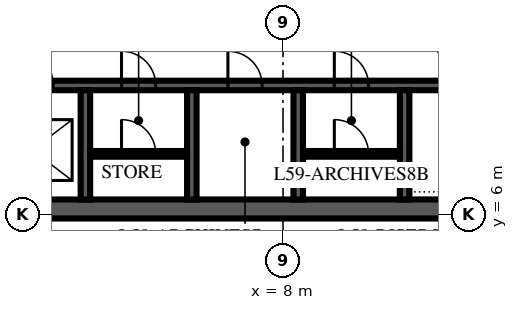
"""IFC4 building model, lengths in metres.
Left out: names, types, materials, properties, quantities, classifications, styles, units other than length and angle.
Written with IfcOpenShell. Run it as: python <this file> out.ifc"""

import sys

from ifc_helpers import new_model, si_unit, direction, frame, frame_2d, origin, place, context, subcontext, project, spatial, rectangle, extrude, element, fill, save


model = new_model("IFC4")
c1 = context("Model", 3, precision=1e-05, world=origin(), true_north=direction((0.0, 1.0)))
c2 = subcontext(c1, "Body", "Model", "MODEL_VIEW")
j1 = project(units=[si_unit("LENGTHUNIT", "METRE"), si_unit("PLANEANGLEUNIT", "RADIAN")], contexts=[c1])
p1 = place(None, origin())
s1 = spatial("IfcSite", under=j1, at=p1, CompositionType="ELEMENT")
p2 = place(p1, origin())
s2 = spatial("IfcBuilding", under=s1, at=p2, CompositionType="ELEMENT")
p3 = place(p2, frame((0.0, 0.0, 256.0)))
s3 = spatial("IfcBuildingStorey", under=s2, at=p3, CompositionType="ELEMENT", Elevation=256.0)
p4 = place(p3, frame((-13.85, 6.15, 0.0), z_axis=(0.0, 0.0, 1.0), x_axis=(1.0, 0.0, 0.0)))
e1 = element("IfcWall", 1, at=p4, inside=s3, PredefinedType="SHEAR", context=c2, shape_type="SweptSolid", body=[
    extrude(rectangle(XDim=27.7, YDim=0.5, at=frame_2d((13.85, 0.0))), origin(), (0.0, 0.0, 1.0), 4.0),
])
p5 = place(p3, frame((-13.6, 9.4, 0.0), z_axis=(0.0, 0.0, 1.0), x_axis=(1.0, 0.0, 0.0)))
e2 = element("IfcWall", 2, at=p5, inside=s3, PredefinedType="SHEAR", context=c2, shape_type="SweptSolid", body=[
    extrude(rectangle(XDim=27.2, YDim=0.25, at=frame_2d((13.6, 0.0))), origin(), (0.0, 0.0, 1.0), 4.0),
])
p6 = place(p5, frame((8.85, 0.0, 0.0)))
e3 = element("IfcOpeningElement", 3, at=p6, cuts=e2, PredefinedType="OPENING", context=c2, shape_type="SweptSolid", body=[
    extrude(rectangle(XDim=1.1, YDim=2.1, at=frame_2d((0.55, 1.05))), frame((0.0, 0.14, 0.0), z_axis=(0.0, -1.0, 0.0), x_axis=(1.0, 0.0, 0.0)), (0.0, 0.0, 1.0), 0.28),
])
p7 = place(p5, frame((11.65, 0.0, 0.0)))
e4 = element("IfcOpeningElement", 4, at=p7, cuts=e2, PredefinedType="OPENING", context=c2, shape_type="SweptSolid", body=[
    extrude(rectangle(XDim=1.1, YDim=2.1, at=frame_2d((0.55, 1.05))), frame((0.0, 0.14, 0.0), z_axis=(0.0, -1.0, 0.0), x_axis=(1.0, 0.0, 0.0)), (0.0, 0.0, 1.0), 0.28),
])
p8 = place(p5, frame((14.45, 0.0, 0.0)))
e5 = element("IfcOpeningElement", 5, at=p8, cuts=e2, PredefinedType="OPENING", context=c2, shape_type="SweptSolid", body=[
    extrude(rectangle(XDim=1.1, YDim=2.1, at=frame_2d((0.55, 1.05))), frame((0.0, 0.14, 0.0), z_axis=(0.0, -1.0, 0.0), x_axis=(1.0, 0.0, 0.0)), (0.0, 0.0, 1.0), 0.28),
])
p9 = place(p5, frame((0.55, 0.0, 0.0)))
e6 = element("IfcOpeningElement", 6, at=p9, cuts=e2, PredefinedType="OPENING", context=c2, shape_type="SweptSolid", body=[
    extrude(rectangle(XDim=0.9, YDim=2.1, at=frame_2d((0.45, 1.05))), frame((0.0, 0.14, 0.0), z_axis=(0.0, -1.0, 0.0), x_axis=(1.0, 0.0, 0.0)), (0.0, 0.0, 1.0), 0.28),
])
p10 = place(p5, frame((3.35, 0.0, 0.0)))
e7 = element("IfcOpeningElement", 7, at=p10, cuts=e2, PredefinedType="OPENING", context=c2, shape_type="SweptSolid", body=[
    extrude(rectangle(XDim=0.9, YDim=2.1, at=frame_2d((0.45, 1.05))), frame((0.0, 0.14, 0.0), z_axis=(0.0, -1.0, 0.0), x_axis=(1.0, 0.0, 0.0)), (0.0, 0.0, 1.0), 0.28),
])
p11 = place(p5, frame((6.15, 0.0, 0.0)))
e8 = element("IfcOpeningElement", 8, at=p11, cuts=e2, PredefinedType="OPENING", context=c2, shape_type="SweptSolid", body=[
    extrude(rectangle(XDim=0.9, YDim=2.1, at=frame_2d((0.45, 1.05))), frame((0.0, 0.14, 0.0), z_axis=(0.0, -1.0, 0.0), x_axis=(1.0, 0.0, 0.0)), (0.0, 0.0, 1.0), 0.28),
])
p12 = place(p5, frame((17.35, 0.0, 0.0)))
e9 = element("IfcOpeningElement", 9, at=p12, cuts=e2, PredefinedType="OPENING", context=c2, shape_type="SweptSolid", body=[
    extrude(rectangle(XDim=0.9, YDim=2.1, at=frame_2d((0.45, 1.05))), frame((0.0, 0.14, 0.0), z_axis=(0.0, -1.0, 0.0), x_axis=(1.0, 0.0, 0.0)), (0.0, 0.0, 1.0), 0.28),
])
p13 = place(p5, frame((20.15, 0.0, 0.0)))
e10 = element("IfcOpeningElement", 10, at=p13, cuts=e2, PredefinedType="OPENING", context=c2, shape_type="SweptSolid", body=[
    extrude(rectangle(XDim=0.9, YDim=2.1, at=frame_2d((0.45, 1.05))), frame((0.0, 0.14, 0.0), z_axis=(0.0, -1.0, 0.0), x_axis=(1.0, 0.0, 0.0)), (0.0, 0.0, 1.0), 0.28),
])
p14 = place(p5, frame((22.95, 0.0, 0.0)))
e11 = element("IfcOpeningElement", 11, at=p14, cuts=e2, PredefinedType="OPENING", context=c2, shape_type="SweptSolid", body=[
    extrude(rectangle(XDim=0.9, YDim=2.1, at=frame_2d((0.45, 1.05))), frame((0.0, 0.14, 0.0), z_axis=(0.0, -1.0, 0.0), x_axis=(1.0, 0.0, 0.0)), (0.0, 0.0, 1.0), 0.28),
])
for number, where, z_axis, x_axis in (
    (12, (2.8, 6.4, 0.0), (0.0, 0.0, 1.0), (0.0, 1.0, 0.0)),
    (13, (5.6, 6.4, 0.0), (0.0, 0.0, 1.0), (0.0, 1.0, 0.0)),
    (14, (8.4, 6.4, 0.0), (0.0, 0.0, 1.0), (0.0, 1.0, 0.0)),
    (15, (11.2, 6.4, 0.0), (0.0, 0.0, 1.0), (0.0, 1.0, 0.0)),
):
    element("IfcWall", number, at=place(p3, frame(where, z_axis=z_axis, x_axis=x_axis)), inside=s3, PredefinedType="SHEAR", context=c2, shape_type="SweptSolid", body=[
        extrude(rectangle(XDim=2.875, YDim=0.25, at=frame_2d((1.438, 0.0))), origin(), (0.0, 0.0, 1.0), 4.0),
    ])
p15 = place(p3, frame((2.925, 7.6, 0.0), z_axis=(0.0, 0.0, 1.0), x_axis=(1.0, 0.0, 0.0)))
e16 = element("IfcWall", 16, at=p15, inside=s3, PredefinedType="PARTITIONING", context=c2, shape_type="SweptSolid", body=[
    extrude(rectangle(XDim=2.55, YDim=0.15, at=frame_2d((1.275, 0.0))), origin(), (0.0, 0.0, 1.0), 3.85),
])
p16 = place(p15, frame((0.825, 0.0, 0.0)))
e17 = element("IfcOpeningElement", 17, at=p16, cuts=e16, PredefinedType="OPENING", context=c2, shape_type="SweptSolid", body=[
    extrude(rectangle(XDim=0.9, YDim=2.1, at=frame_2d((0.45, 1.05))), frame((0.0, 0.09, 0.0), z_axis=(0.0, -1.0, 0.0), x_axis=(1.0, 0.0, 0.0)), (0.0, 0.0, 1.0), 0.18),
])
p17 = place(p3, frame((8.525, 7.6, 0.0), z_axis=(0.0, 0.0, 1.0), x_axis=(1.0, 0.0, 0.0)))
e18 = element("IfcWall", 18, at=p17, inside=s3, PredefinedType="PARTITIONING", context=c2, shape_type="SweptSolid", body=[
    extrude(rectangle(XDim=2.55, YDim=0.15, at=frame_2d((1.275, 0.0))), origin(), (0.0, 0.0, 1.0), 3.85),
])
p18 = place(p17, frame((0.825, 0.0, 0.0)))
e19 = element("IfcOpeningElement", 19, at=p18, cuts=e18, PredefinedType="OPENING", context=c2, shape_type="SweptSolid", body=[
    extrude(rectangle(XDim=0.9, YDim=2.1, at=frame_2d((0.45, 1.05))), frame((0.0, 0.09, 0.0), z_axis=(0.0, -1.0, 0.0), x_axis=(1.0, 0.0, 0.0)), (0.0, 0.0, 1.0), 0.18),
])
p19 = place(p8, origin())
e20 = element("IfcDoor", 20, at=p19, inside=s3, OperationType="SLIDING_TO_LEFT", PredefinedType="DOOR", context=c2, shape_type="SweptSolid", body=[
    extrude(rectangle(XDim=1.1, YDim=2.1, at=frame_2d((0.55, 1.05))), frame((0.0, 0.125, 0.0), z_axis=(0.0, -1.0, 0.0), x_axis=(1.0, 0.0, 0.0)), (0.0, 0.0, 1.0), 0.25),
])
fill(e5, e20)
p20 = place(p12, origin())
e21 = element("IfcDoor", 21, at=p20, inside=s3, OperationType="SINGLE_SWING_LEFT", PredefinedType="DOOR", context=c2, shape_type="SweptSolid", body=[
    extrude(rectangle(XDim=0.9, YDim=2.1, at=frame_2d((0.45, 1.05))), frame((0.0, 0.125, 0.0), z_axis=(0.0, -1.0, 0.0), x_axis=(1.0, 0.0, 0.0)), (0.0, 0.0, 1.0), 0.25),
])
fill(e9, e21)
p21 = place(p16, origin())
e22 = element("IfcDoor", 22, at=p21, inside=s3, OperationType="SINGLE_SWING_LEFT", PredefinedType="DOOR", context=c2, shape_type="SweptSolid", body=[
    extrude(rectangle(XDim=0.9, YDim=2.1, at=frame_2d((0.45, 1.05))), frame((0.0, 0.075, 0.0), z_axis=(0.0, -1.0, 0.0), x_axis=(1.0, 0.0, 0.0)), (0.0, 0.0, 1.0), 0.149),
])
fill(e17, e22)
p22 = place(p13, origin())
e23 = element("IfcDoor", 23, at=p22, inside=s3, OperationType="SINGLE_SWING_LEFT", PredefinedType="DOOR", context=c2, shape_type="SweptSolid", body=[
    extrude(rectangle(XDim=0.9, YDim=2.1, at=frame_2d((0.45, 1.05))), frame((0.0, 0.125, 0.0), z_axis=(0.0, -1.0, 0.0), x_axis=(1.0, 0.0, 0.0)), (0.0, 0.0, 1.0), 0.25),
])
fill(e10, e23)
p23 = place(p14, origin())
e24 = element("IfcDoor", 24, at=p23, inside=s3, OperationType="SINGLE_SWING_LEFT", PredefinedType="DOOR", context=c2, shape_type="SweptSolid", body=[
    extrude(rectangle(XDim=0.9, YDim=2.1, at=frame_2d((0.45, 1.05))), frame((0.0, 0.125, 0.0), z_axis=(0.0, -1.0, 0.0), x_axis=(1.0, 0.0, 0.0)), (0.0, 0.0, 1.0), 0.25),
])
fill(e11, e24)
p24 = place(p18, origin())
e25 = element("IfcDoor", 25, at=p24, inside=s3, OperationType="SINGLE_SWING_LEFT", PredefinedType="DOOR", context=c2, shape_type="SweptSolid", body=[
    extrude(rectangle(XDim=0.9, YDim=2.1, at=frame_2d((0.45, 1.05))), frame((0.0, 0.075, 0.0), z_axis=(0.0, -1.0, 0.0), x_axis=(1.0, 0.0, 0.0)), (0.0, 0.0, 1.0), 0.149),
])
fill(e19, e25)
save(model, sys.argv[1])
